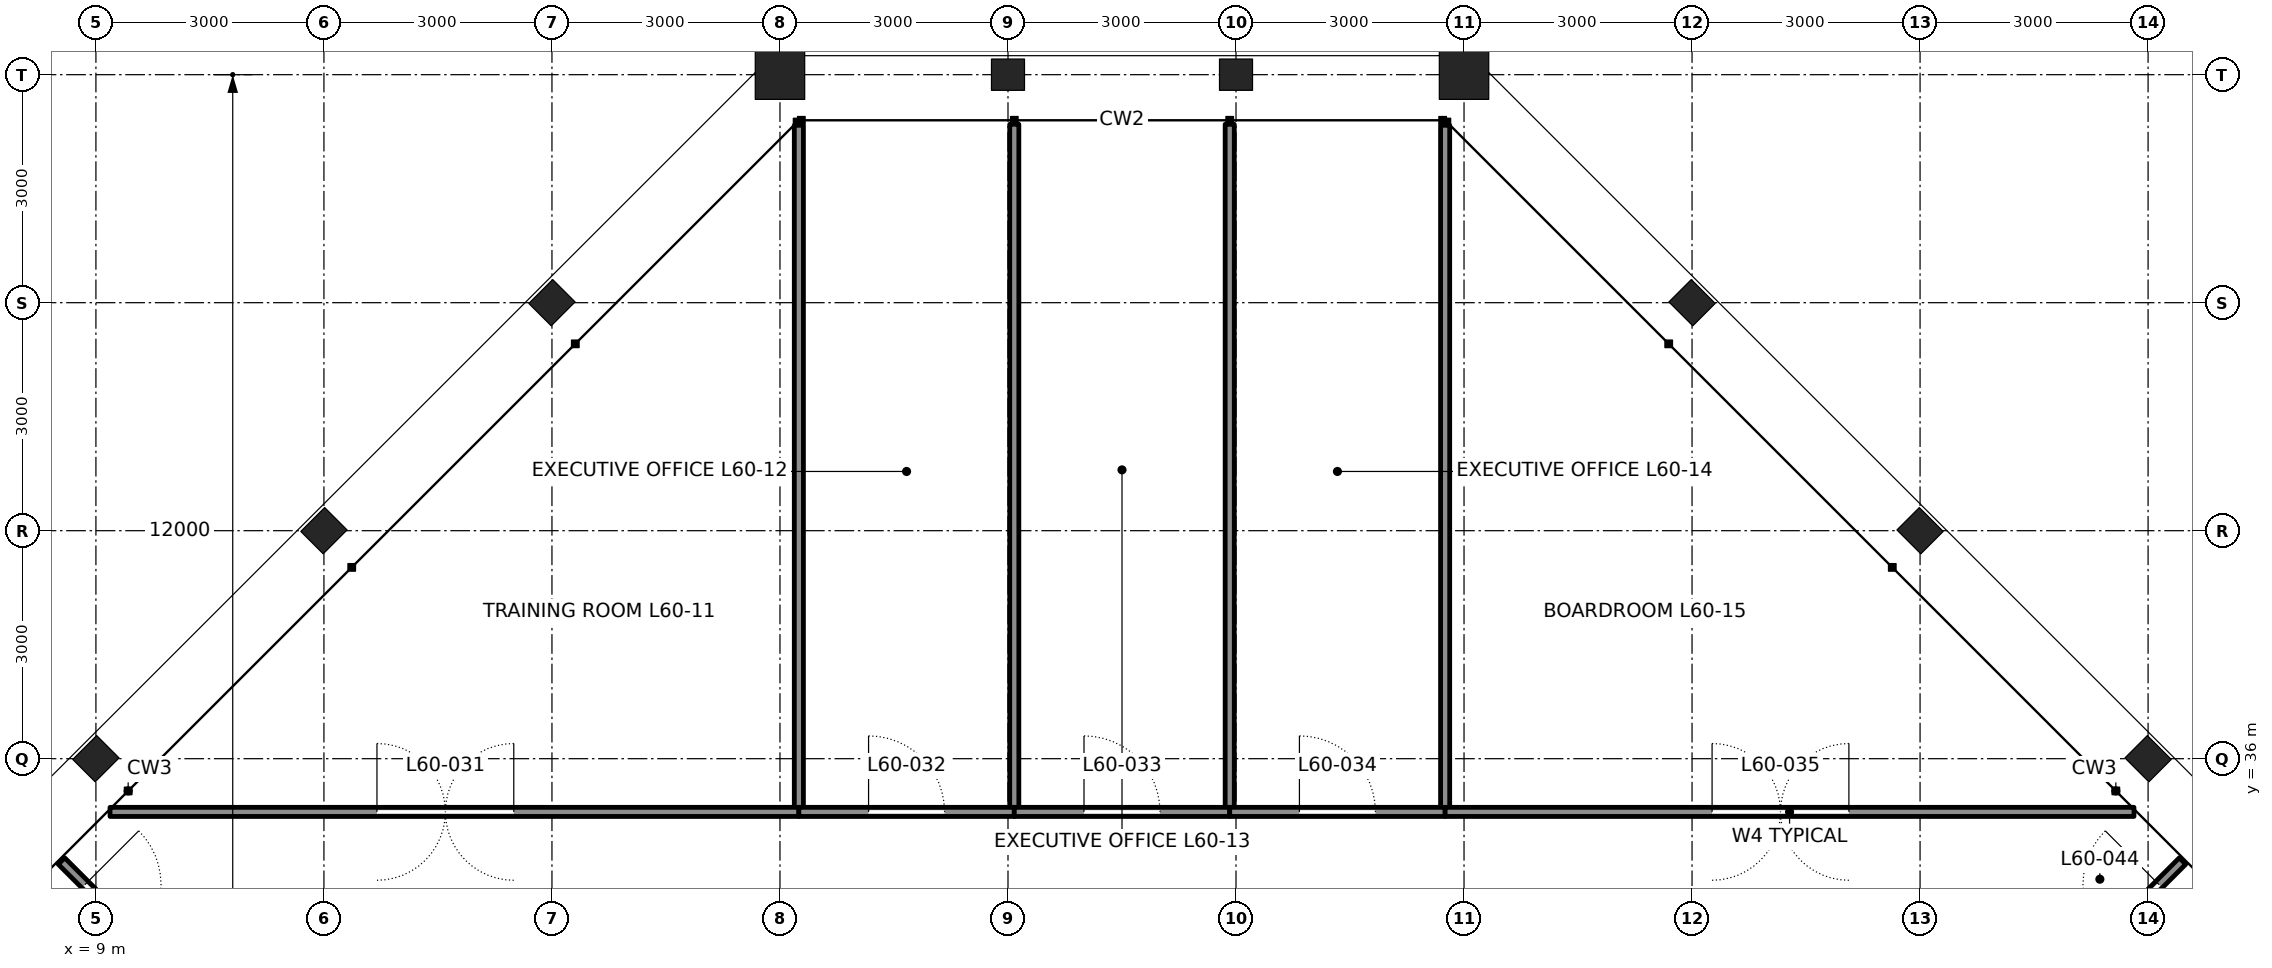
"""IFC4 building model, lengths in metres.
Left out: names, types, materials, properties, quantities, classifications, styles, units other than length and angle.
Written with IfcOpenShell. Run it as: python <this file> out.ifc"""

import sys

from ifc_helpers import new_model, si_unit, direction, frame, frame_2d, origin, origin_2d, place, context, subcontext, project, spatial, rectangle, hollow_rectangle, i_section, extrude, element, fill, save


model = new_model("IFC4")
c1 = context("Model", 3, precision=1e-05, world=origin(), true_north=direction((0.0, 1.0)))
c2 = subcontext(c1, "Body", "Model", "MODEL_VIEW")
j1 = project(units=[si_unit("LENGTHUNIT", "METRE"), si_unit("PLANEANGLEUNIT", "RADIAN")], contexts=[c1])
p1 = place(None, origin())
s1 = spatial("IfcSite", under=j1, at=p1, CompositionType="ELEMENT")
p2 = place(p1, origin())
s2 = spatial("IfcBuilding", under=s1, at=p2, CompositionType="ELEMENT")
p3 = place(p2, frame((0.0, 0.0, 270.6)))
s3 = spatial("IfcBuildingStorey", under=s2, at=p3, CompositionType="ELEMENT", Elevation=270.6)
for number, where, z_axis, x_axis in (
    (1, (36.0, 36.0, 0.0), (0.0, 0.0, 1.0), (0.707, 0.707, 0.0)),
    (2, (33.0, 39.0, 0.0), (0.0, 0.0, 1.0), (0.707, 0.707, 0.0)),
    (3, (30.0, 42.0, 0.0), (0.0, 0.0, 1.0), (0.707, 0.707, 0.0)),
):
    element("IfcColumn", number, at=place(p3, frame(where, z_axis=z_axis, x_axis=x_axis)), inside=s3, PredefinedType="COLUMN", context=c2, shape_type="SweptSolid", body=[
        extrude(i_section(OverallWidth=0.417, OverallDepth=0.445, WebThickness=0.039, FlangeThickness=0.063, at=origin_2d()), origin(), (0.0, 0.0, 1.0), 4.2),
    ])
p4 = place(p3, frame((27.0, 45.0, 0.0), z_axis=(0.0, 0.0, 1.0), x_axis=(0.0, 1.0, 0.0)))
e4 = element("IfcColumn", 4, at=p4, inside=s3, PredefinedType="COLUMN", context=c2, shape_type="SweptSolid", body=[
    extrude(hollow_rectangle(XDim=0.65, YDim=0.65, WallThickness=0.065, at=origin_2d()), origin(), (0.0, 0.0, 1.0), 4.2),
])
for number, where, z_axis, x_axis in (
    (5, (24.0, 45.0, 0.0), (0.0, 0.0, 1.0), (0.0, 1.0, 0.0)),
    (6, (21.0, 45.0, 0.0), (0.0, 0.0, 1.0), (0.0, 1.0, 0.0)),
):
    element("IfcColumn", number, at=place(p3, frame(where, z_axis=z_axis, x_axis=x_axis)), inside=s3, PredefinedType="COLUMN", context=c2, shape_type="SweptSolid", body=[
        extrude(i_section(OverallWidth=0.411, OverallDepth=0.434, WebThickness=0.036, FlangeThickness=0.057, at=origin_2d()), origin(), (0.0, 0.0, 1.0), 4.2),
    ])
p5 = place(p3, frame((18.0, 45.0, 0.0), z_axis=(0.0, 0.0, 1.0), x_axis=(0.0, 1.0, 0.0)))
e7 = element("IfcColumn", 7, at=p5, inside=s3, PredefinedType="COLUMN", context=c2, shape_type="SweptSolid", body=[
    extrude(hollow_rectangle(XDim=0.65, YDim=0.65, WallThickness=0.065, at=origin_2d()), origin(), (0.0, 0.0, 1.0), 4.2),
])
for number, where, z_axis, x_axis in (
    (8, (15.0, 42.0, 0.0), (0.0, 0.0, 1.0), (-0.707, 0.707, 0.0)),
    (9, (12.0, 39.0, 0.0), (0.0, 0.0, 1.0), (-0.707, 0.707, 0.0)),
    (10, (9.0, 36.0, 0.0), (0.0, 0.0, 1.0), (-0.707, 0.707, 0.0)),
):
    element("IfcColumn", number, at=place(p3, frame(where, z_axis=z_axis, x_axis=x_axis)), inside=s3, PredefinedType="COLUMN", context=c2, shape_type="SweptSolid", body=[
        extrude(i_section(OverallWidth=0.417, OverallDepth=0.445, WebThickness=0.039, FlangeThickness=0.063, at=origin_2d()), origin(), (0.0, 0.0, 1.0), 4.2),
    ])
p6 = place(p3, frame((18.249, 44.334, 0.0), z_axis=(0.0, 0.0, 1.0), x_axis=(0.0, -1.0, 0.0)))
e11 = element("IfcWall", 11, at=p6, inside=s3, PredefinedType="PARTITIONING", context=c2, shape_type="SweptSolid", body=[
    extrude(rectangle(XDim=9.034, YDim=0.12, at=frame_2d((4.517, 0.0))), origin(), (0.0, 0.0, 1.0), 4.04),
])
for number, where, z_axis, x_axis in (
    (12, (21.083, 44.347, 0.0), (0.0, 0.0, 1.0), (0.0, -1.0, 0.0)),
    (13, (23.917, 44.347, 0.0), (0.0, 0.0, 1.0), (0.0, -1.0, 0.0)),
):
    element("IfcWall", number, at=place(p3, frame(where, z_axis=z_axis, x_axis=x_axis)), inside=s3, PredefinedType="PARTITIONING", context=c2, shape_type="SweptSolid", body=[
        extrude(rectangle(XDim=9.047, YDim=0.12, at=frame_2d((4.524, 0.0))), origin(), (0.0, 0.0, 1.0), 3.357),
    ])
p7 = place(p3, frame((26.751, 44.334, 0.0), z_axis=(0.0, 0.0, 1.0), x_axis=(0.0, -1.0, 0.0)))
e14 = element("IfcWall", 14, at=p7, inside=s3, PredefinedType="PARTITIONING", context=c2, shape_type="SweptSolid", body=[
    extrude(rectangle(XDim=9.034, YDim=0.12, at=frame_2d((4.517, 0.0))), origin(), (0.0, 0.0, 1.0), 4.04),
])
p8 = place(p3, frame((9.186, 35.3, 0.0), z_axis=(0.0, 0.0, 1.0), x_axis=(1.0, 0.0, 0.0)))
e15 = element("IfcWall", 15, at=p8, inside=s3, PredefinedType="PARTITIONING", context=c2, shape_type="SweptSolid", body=[
    extrude(rectangle(XDim=9.063, YDim=0.12, at=frame_2d((4.531, 0.0))), origin(), (0.0, 0.0, 1.0), 4.04),
])
p9 = place(p8, frame((3.512, 0.0, 0.0)))
e16 = element("IfcOpeningElement", 16, at=p9, cuts=e15, PredefinedType="OPENING", context=c2, shape_type="SweptSolid", body=[
    extrude(rectangle(XDim=1.8, YDim=2.4, at=frame_2d((0.9, 1.2))), frame((0.0, 0.07, 0.0), z_axis=(0.0, -1.0, 0.0), x_axis=(1.0, 0.0, 0.0)), (0.0, 0.0, 1.0), 0.14),
])
p10 = place(p3, frame((18.249, 35.3, 0.0), z_axis=(0.0, 0.0, 1.0), x_axis=(1.0, 0.0, 0.0)))
e17 = element("IfcWall", 17, at=p10, inside=s3, PredefinedType="PARTITIONING", context=c2, shape_type="SweptSolid", body=[
    extrude(rectangle(XDim=2.834, YDim=0.12, at=frame_2d((1.417, 0.0))), origin(), (0.0, 0.0, 1.0), 4.04),
])
p11 = place(p10, frame((0.917, 0.0, 0.0)))
e18 = element("IfcOpeningElement", 18, at=p11, cuts=e17, PredefinedType="OPENING", context=c2, shape_type="SweptSolid", body=[
    extrude(rectangle(XDim=1.0, YDim=2.4, at=frame_2d((0.5, 1.2))), frame((0.0, 0.07, 0.0), z_axis=(0.0, -1.0, 0.0), x_axis=(1.0, 0.0, 0.0)), (0.0, 0.0, 1.0), 0.14),
])
p12 = place(p3, frame((21.083, 35.3, 0.0), z_axis=(0.0, 0.0, 1.0), x_axis=(1.0, 0.0, 0.0)))
e19 = element("IfcWall", 19, at=p12, inside=s3, PredefinedType="PARTITIONING", context=c2, shape_type="SweptSolid", body=[
    extrude(rectangle(XDim=2.834, YDim=0.12, at=frame_2d((1.417, 0.0))), origin(), (0.0, 0.0, 1.0), 4.04),
])
p13 = place(p12, frame((0.917, 0.0, 0.0)))
e20 = element("IfcOpeningElement", 20, at=p13, cuts=e19, PredefinedType="OPENING", context=c2, shape_type="SweptSolid", body=[
    extrude(rectangle(XDim=1.0, YDim=2.4, at=frame_2d((0.5, 1.2))), frame((0.0, 0.07, 0.0), z_axis=(0.0, -1.0, 0.0), x_axis=(1.0, 0.0, 0.0)), (0.0, 0.0, 1.0), 0.14),
])
p14 = place(p3, frame((23.917, 35.3, 0.0), z_axis=(0.0, 0.0, 1.0), x_axis=(1.0, 0.0, 0.0)))
e21 = element("IfcWall", 21, at=p14, inside=s3, PredefinedType="PARTITIONING", context=c2, shape_type="SweptSolid", body=[
    extrude(rectangle(XDim=2.834, YDim=0.12, at=frame_2d((1.417, 0.0))), origin(), (0.0, 0.0, 1.0), 4.04),
])
p15 = place(p14, frame((0.917, 0.0, 0.0)))
e22 = element("IfcOpeningElement", 22, at=p15, cuts=e21, PredefinedType="OPENING", context=c2, shape_type="SweptSolid", body=[
    extrude(rectangle(XDim=1.0, YDim=2.4, at=frame_2d((0.5, 1.2))), frame((0.0, 0.07, 0.0), z_axis=(0.0, -1.0, 0.0), x_axis=(1.0, 0.0, 0.0)), (0.0, 0.0, 1.0), 0.14),
])
p16 = place(p3, frame((26.751, 35.3, 0.0), z_axis=(0.0, 0.0, 1.0), x_axis=(1.0, 0.0, 0.0)))
e23 = element("IfcWall", 23, at=p16, inside=s3, PredefinedType="PARTITIONING", context=c2, shape_type="SweptSolid", body=[
    extrude(rectangle(XDim=9.063, YDim=0.12, at=frame_2d((4.531, 0.0))), origin(), (0.0, 0.0, 1.0), 4.04),
])
p17 = place(p16, frame((3.512, 0.0, 0.0)))
e24 = element("IfcOpeningElement", 24, at=p17, cuts=e23, PredefinedType="OPENING", context=c2, shape_type="SweptSolid", body=[
    extrude(rectangle(XDim=1.8, YDim=2.4, at=frame_2d((0.9, 1.2))), frame((0.0, 0.07, 0.0), z_axis=(0.0, -1.0, 0.0), x_axis=(1.0, 0.0, 0.0)), (0.0, 0.0, 1.0), 0.14),
])
p18 = place(p3, frame((34.8, 33.0, 0.0), z_axis=(0.0, 0.0, 1.0), x_axis=(0.707106781187, 0.707106781187, 0.0)))
e25 = element("IfcWall", 25, at=p18, inside=s3, PredefinedType="PARTITIONING", context=c2, shape_type="SweptSolid", body=[
    extrude(rectangle(XDim=2.338, YDim=0.12, at=frame_2d((1.169, 0.0))), origin(), (0.0, 0.0, 1.0), 4.04),
])
p19 = place(p18, frame((0.9, 0.0, 0.0)))
e26 = element("IfcOpeningElement", 26, at=p19, cuts=e25, PredefinedType="OPENING", context=c2, shape_type="SweptSolid", body=[
    extrude(rectangle(XDim=1.0, YDim=2.4, at=frame_2d((0.5, 1.2))), frame((0.0, 0.07, 0.0), z_axis=(0.0, -1.0, 0.0), x_axis=(1.0, 0.0, 0.0)), (0.0, 0.0, 1.0), 0.14),
])
p20 = place(p3, frame((10.2, 33.0, 0.0), z_axis=(0.0, 0.0, 1.0), x_axis=(-0.707106781187, 0.707106781187, 0.0)))
e27 = element("IfcWall", 27, at=p20, inside=s3, PredefinedType="PARTITIONING", context=c2, shape_type="SweptSolid", body=[
    extrude(rectangle(XDim=2.338, YDim=0.12, at=frame_2d((1.169, 0.0))), origin(), (0.0, 0.0, 1.0), 4.04),
])
p21 = place(p20, frame((0.9, 0.0, 0.0)))
e28 = element("IfcOpeningElement", 28, at=p21, cuts=e27, PredefinedType="OPENING", context=c2, shape_type="SweptSolid", body=[
    extrude(rectangle(XDim=1.0, YDim=2.4, at=frame_2d((0.5, 1.2))), frame((0.0, 0.07, 0.0), z_axis=(0.0, -1.0, 0.0), x_axis=(1.0, 0.0, 0.0)), (0.0, 0.0, 1.0), 0.14),
])
p22 = place(p9, origin())
e29 = element("IfcDoor", 29, at=p22, inside=s3, OperationType="DOUBLE_DOOR_DOUBLE_SWING", PredefinedType="DOOR", context=c2, shape_type="SweptSolid", body=[
    extrude(rectangle(XDim=1.8, YDim=2.4, at=frame_2d((0.9, 1.2))), frame((0.0, 0.025, 0.0), z_axis=(0.0, -1.0, 0.0), x_axis=(1.0, 0.0, 0.0)), (0.0, 0.0, 1.0), 0.05),
])
fill(e16, e29)
p23 = place(p11, origin())
e30 = element("IfcDoor", 30, at=p23, inside=s3, OperationType="SINGLE_SWING_LEFT", PredefinedType="DOOR", context=c2, shape_type="SweptSolid", body=[
    extrude(rectangle(XDim=1.0, YDim=2.4, at=frame_2d((0.5, 1.2))), frame((0.0, 0.025, 0.0), z_axis=(0.0, -1.0, 0.0), x_axis=(1.0, 0.0, 0.0)), (0.0, 0.0, 1.0), 0.05),
])
fill(e18, e30)
p24 = place(p13, origin())
e31 = element("IfcDoor", 31, at=p24, inside=s3, OperationType="SINGLE_SWING_LEFT", PredefinedType="DOOR", context=c2, shape_type="SweptSolid", body=[
    extrude(rectangle(XDim=1.0, YDim=2.4, at=frame_2d((0.5, 1.2))), frame((0.0, 0.025, 0.0), z_axis=(0.0, -1.0, 0.0), x_axis=(1.0, 0.0, 0.0)), (0.0, 0.0, 1.0), 0.05),
])
fill(e20, e31)
p25 = place(p15, origin())
e32 = element("IfcDoor", 32, at=p25, inside=s3, OperationType="SINGLE_SWING_LEFT", PredefinedType="DOOR", context=c2, shape_type="SweptSolid", body=[
    extrude(rectangle(XDim=1.0, YDim=2.4, at=frame_2d((0.5, 1.2))), frame((0.0, 0.025, 0.0), z_axis=(0.0, -1.0, 0.0), x_axis=(1.0, 0.0, 0.0)), (0.0, 0.0, 1.0), 0.05),
])
fill(e22, e32)
p26 = place(p17, origin())
e33 = element("IfcDoor", 33, at=p26, inside=s3, OperationType="DOUBLE_DOOR_DOUBLE_SWING", PredefinedType="DOOR", context=c2, shape_type="SweptSolid", body=[
    extrude(rectangle(XDim=1.8, YDim=2.4, at=frame_2d((0.9, 1.2))), frame((0.0, 0.025, 0.0), z_axis=(0.0, -1.0, 0.0), x_axis=(1.0, 0.0, 0.0)), (0.0, 0.0, 1.0), 0.05),
])
fill(e24, e33)
p27 = place(p19, origin())
e34 = element("IfcDoor", 34, at=p27, inside=s3, OperationType="SINGLE_SWING_RIGHT", PredefinedType="DOOR", context=c2, shape_type="SweptSolid", body=[
    extrude(rectangle(XDim=1.0, YDim=2.4, at=frame_2d((0.5, 1.2))), frame((0.0, 0.025, 0.0), z_axis=(0.0, -1.0, 0.0), x_axis=(1.0, 0.0, 0.0)), (0.0, 0.0, 1.0), 0.05),
])
fill(e26, e34)
p28 = place(p21, frame((1.0, 0.0, 0.0), z_axis=(0.0, 0.0, 1.0), x_axis=(-1.0, 0.0, 0.0)))
e35 = element("IfcDoor", 35, at=p28, inside=s3, OperationType="SINGLE_SWING_LEFT", PredefinedType="DOOR", context=c2, shape_type="SweptSolid", body=[
    extrude(rectangle(XDim=1.0, YDim=2.4, at=frame_2d((0.5, 1.2))), frame((0.0, 0.025, 0.0), z_axis=(0.0, -1.0, 0.0), x_axis=(1.0, 0.0, 0.0)), (0.0, 0.0, 1.0), 0.05),
])
fill(e28, e35)
save(model, sys.argv[1])
